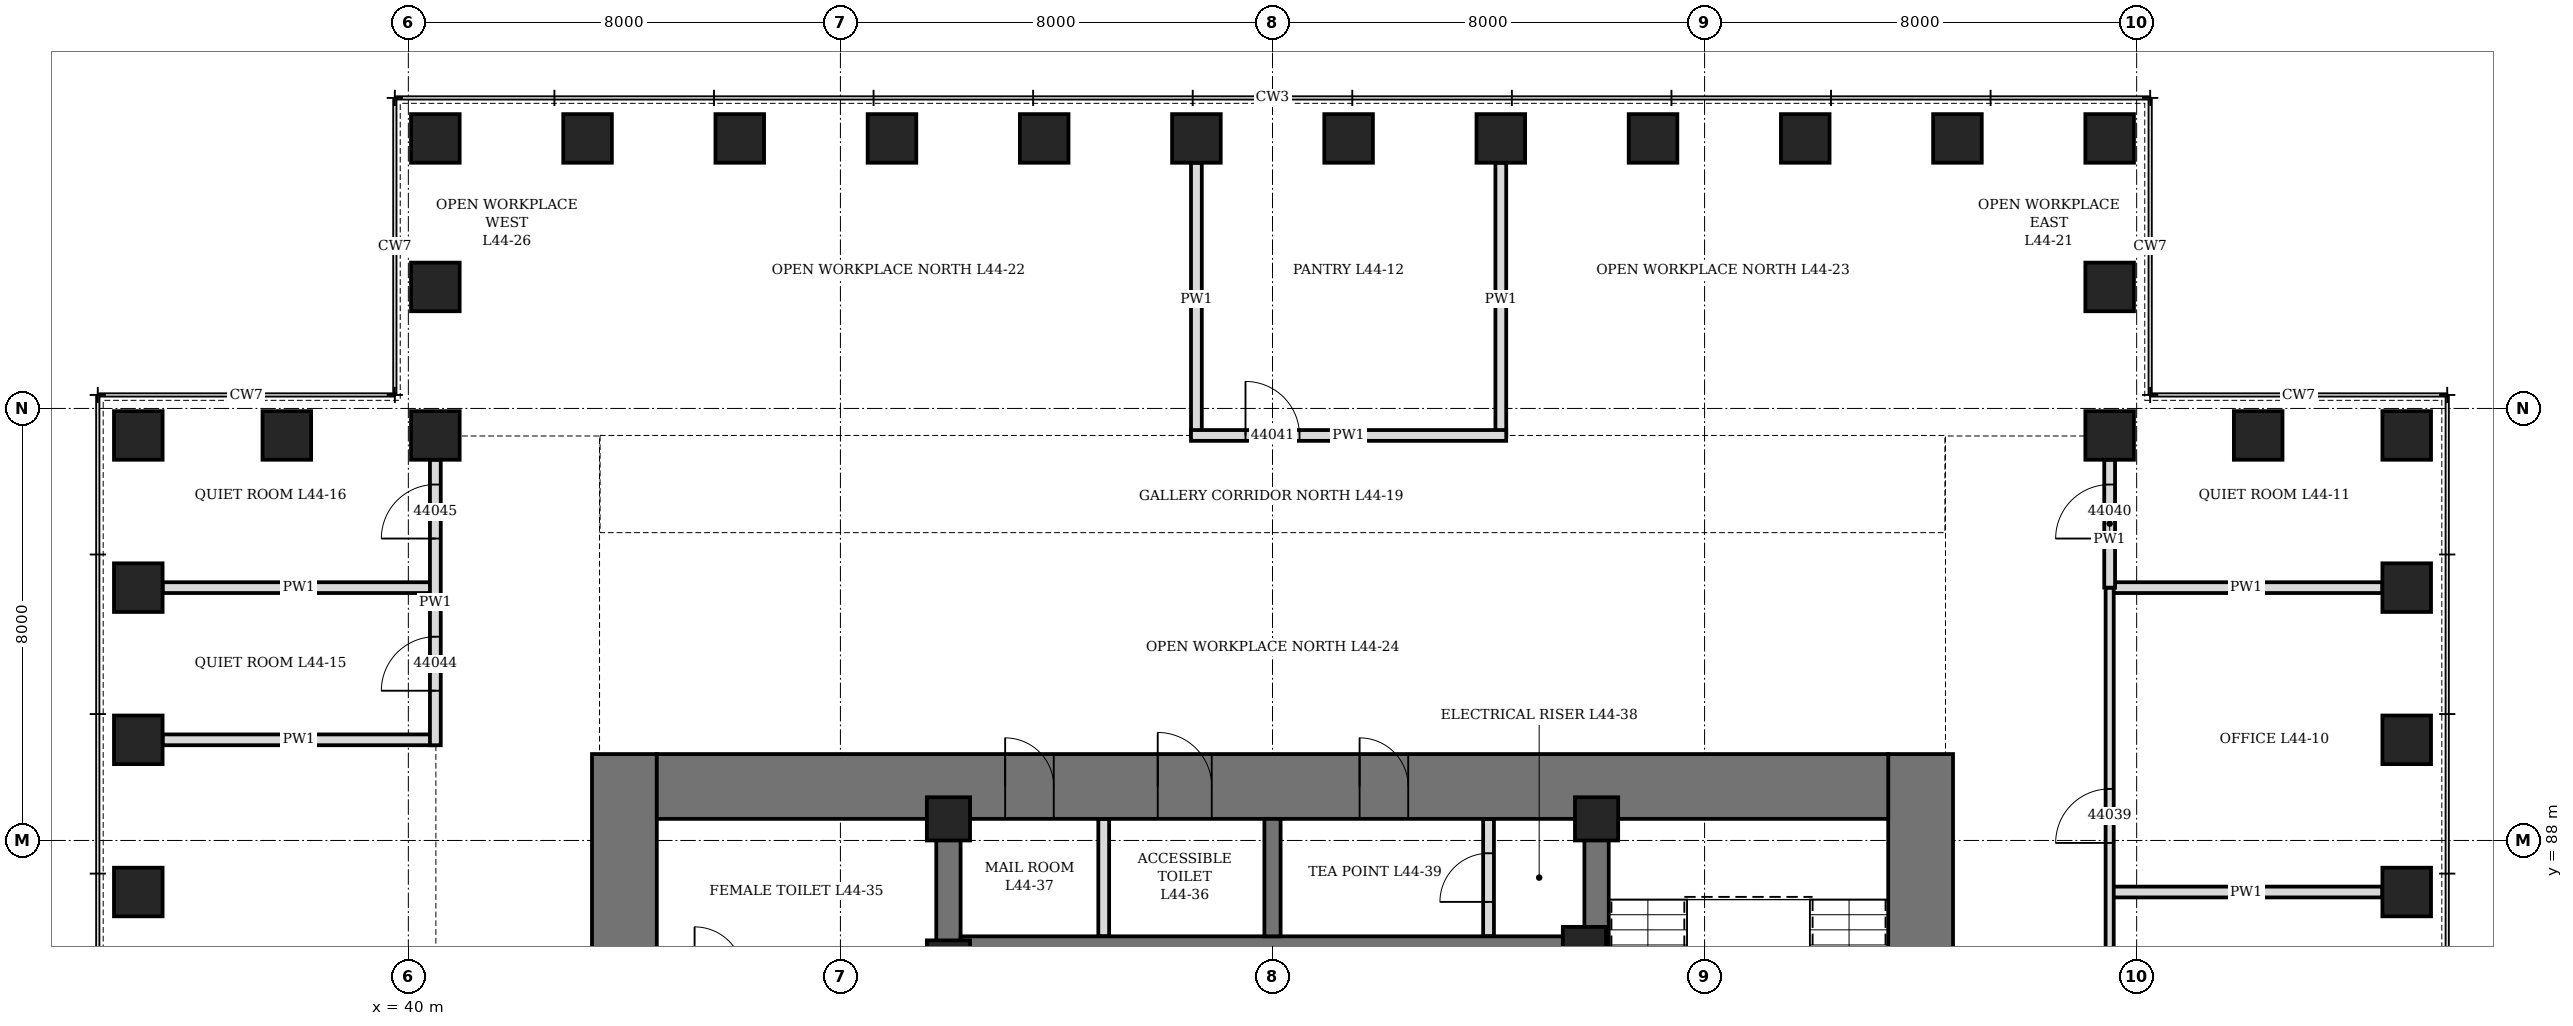
"""IFC4 building model, lengths in metres.
Left out: names, types, materials, properties, quantities, classifications, styles, units other than length and angle.
Written with IfcOpenShell. Run it as: python <this file> out.ifc"""

import sys

from ifc_helpers import new_model, si_unit, direction, frame, frame_2d, origin, origin_2d, place, context, subcontext, project, spatial, rectangle, hollow_rectangle, extrude, element, fill, save


model = new_model("IFC4")
c1 = context("Model", 3, precision=1e-05, world=origin(), true_north=direction((0.0, 1.0)))
c2 = subcontext(c1, "Body", "Model", "MODEL_VIEW")
j1 = project(units=[si_unit("LENGTHUNIT", "METRE"), si_unit("PLANEANGLEUNIT", "RADIAN")], contexts=[c1])
p1 = place(None, origin())
s1 = spatial("IfcSite", under=j1, at=p1, CompositionType="ELEMENT")
p2 = place(p1, origin())
s2 = spatial("IfcBuilding", under=s1, at=p2, CompositionType="ELEMENT")
p3 = place(p2, frame((0.0, 0.0, 198.1)))
s3 = spatial("IfcBuildingStorey", under=s2, at=p3, CompositionType="ELEMENT", Elevation=198.1)
for number, where, z_axis, x_axis in (
    (1, (77.0, 87.045, 0.0), (0.0, 0.0, 1.0), (0.0, 1.0, 0.0)),
    (2, (77.0, 89.864, 0.0), (0.0, 0.0, 1.0), (0.0, 1.0, 0.0)),
    (3, (77.0, 92.682, 0.0), (0.0, 0.0, 1.0), (0.0, 1.0, 0.0)),
    (4, (77.0, 95.5, 0.0), (0.0, 0.0, 1.0), (1.0, 0.0, 0.0)),
    (5, (74.25, 95.5, 0.0), (0.0, 0.0, 1.0), (1.0, 0.0, 0.0)),
    (6, (71.5, 95.5, 0.0), (0.0, 0.0, 1.0), (0.0, 1.0, 0.0)),
    (7, (71.5, 98.25, 0.0), (0.0, 0.0, 1.0), (0.0, 1.0, 0.0)),
    (8, (71.5, 101.0, 0.0), (0.0, 0.0, 1.0), (1.0, 0.0, 0.0)),
    (9, (68.682, 101.0, 0.0), (0.0, 0.0, 1.0), (1.0, 0.0, 0.0)),
    (10, (65.864, 101.0, 0.0), (0.0, 0.0, 1.0), (1.0, 0.0, 0.0)),
    (11, (63.045, 101.0, 0.0), (0.0, 0.0, 1.0), (1.0, 0.0, 0.0)),
    (12, (60.227, 101.0, 0.0), (0.0, 0.0, 1.0), (1.0, 0.0, 0.0)),
    (13, (57.409, 101.0, 0.0), (0.0, 0.0, 1.0), (1.0, 0.0, 0.0)),
    (14, (54.591, 101.0, 0.0), (0.0, 0.0, 1.0), (1.0, 0.0, 0.0)),
    (15, (51.773, 101.0, 0.0), (0.0, 0.0, 1.0), (1.0, 0.0, 0.0)),
    (16, (48.955, 101.0, 0.0), (0.0, 0.0, 1.0), (1.0, 0.0, 0.0)),
    (17, (46.136, 101.0, 0.0), (0.0, 0.0, 1.0), (1.0, 0.0, 0.0)),
    (18, (43.318, 101.0, 0.0), (0.0, 0.0, 1.0), (1.0, 0.0, 0.0)),
    (19, (40.5, 101.0, 0.0), (0.0, 0.0, 1.0), (0.0, 1.0, 0.0)),
    (20, (40.5, 98.25, 0.0), (0.0, 0.0, 1.0), (0.0, 1.0, 0.0)),
    (21, (40.5, 95.5, 0.0), (0.0, 0.0, 1.0), (1.0, 0.0, 0.0)),
    (22, (37.75, 95.5, 0.0), (0.0, 0.0, 1.0), (1.0, 0.0, 0.0)),
    (23, (35.0, 95.5, 0.0), (0.0, 0.0, 1.0), (0.0, 1.0, 0.0)),
    (24, (35.0, 92.682, 0.0), (0.0, 0.0, 1.0), (0.0, 1.0, 0.0)),
    (25, (35.0, 89.864, 0.0), (0.0, 0.0, 1.0), (0.0, 1.0, 0.0)),
    (26, (35.0, 87.045, 0.0), (0.0, 0.0, 1.0), (0.0, 1.0, 0.0)),
):
    element("IfcColumn", number, at=place(p3, frame(where, z_axis=z_axis, x_axis=x_axis)), inside=s3, PredefinedType="COLUMN", context=c2, shape_type="SweptSolid", body=[
        extrude(hollow_rectangle(XDim=0.9, YDim=0.9, WallThickness=0.12, at=origin_2d()), origin(), (0.0, 0.0, 1.0), 4.2),
    ])
p4 = place(p3, frame((44.0, 70.4, 0.0), z_axis=(0.0, 0.0, 1.0), x_axis=(0.0, 1.0, 0.0)))
e27 = element("IfcWall", 27, at=p4, inside=s3, PredefinedType="SHEAR", context=c2, shape_type="SweptSolid", body=[
    extrude(rectangle(XDim=19.2, YDim=1.2, at=frame_2d((9.6, 0.0))), origin(), (0.0, 0.0, 1.0), 4.2),
])
p5 = place(p4, frame((8.6, 0.0, 0.0)))
e28 = element("IfcOpeningElement", 28, at=p5, cuts=e27, PredefinedType="OPENING", context=c2, shape_type="SweptSolid", body=[
    extrude(rectangle(XDim=2.0, YDim=2.4, at=frame_2d((1.0, 1.2))), frame((0.0, 0.61, 0.0), z_axis=(0.0, -1.0, 0.0), x_axis=(1.0, 0.0, 0.0)), (0.0, 0.0, 1.0), 1.22),
])
p6 = place(p3, frame((68.0, 70.4, 0.0), z_axis=(0.0, 0.0, 1.0), x_axis=(0.0, 1.0, 0.0)))
e29 = element("IfcWall", 29, at=p6, inside=s3, PredefinedType="SHEAR", context=c2, shape_type="SweptSolid", body=[
    extrude(rectangle(XDim=19.2, YDim=1.2, at=frame_2d((9.6, 0.0))), origin(), (0.0, 0.0, 1.0), 4.2),
])
p7 = place(p6, frame((8.6, 0.0, 0.0)))
e30 = element("IfcOpeningElement", 30, at=p7, cuts=e29, PredefinedType="OPENING", context=c2, shape_type="SweptSolid", body=[
    extrude(rectangle(XDim=2.0, YDim=2.4, at=frame_2d((1.0, 1.2))), frame((0.0, 0.61, 0.0), z_axis=(0.0, -1.0, 0.0), x_axis=(1.0, 0.0, 0.0)), (0.0, 0.0, 1.0), 1.22),
])
p8 = place(p3, frame((44.6, 89.0, 0.0), z_axis=(0.0, 0.0, 1.0), x_axis=(1.0, 0.0, 0.0)))
e31 = element("IfcWall", 31, at=p8, inside=s3, PredefinedType="SHEAR", context=c2, shape_type="SweptSolid", body=[
    extrude(rectangle(XDim=22.8, YDim=1.2, at=frame_2d((11.4, 0.0))), origin(), (0.0, 0.0, 1.0), 4.2),
])
p9 = place(p8, frame((9.275, 0.0, 0.0)))
e32 = element("IfcOpeningElement", 32, at=p9, cuts=e31, PredefinedType="OPENING", context=c2, shape_type="SweptSolid", body=[
    extrude(rectangle(XDim=1.0, YDim=2.1, at=frame_2d((0.5, 1.05))), frame((0.0, 0.61, 0.0), z_axis=(0.0, -1.0, 0.0), x_axis=(1.0, 0.0, 0.0)), (0.0, 0.0, 1.0), 1.22),
])
p10 = place(p8, frame((6.45, 0.0, 0.0)))
e33 = element("IfcOpeningElement", 33, at=p10, cuts=e31, PredefinedType="OPENING", context=c2, shape_type="SweptSolid", body=[
    extrude(rectangle(XDim=0.9, YDim=2.1, at=frame_2d((0.45, 1.05))), frame((0.0, 0.61, 0.0), z_axis=(0.0, -1.0, 0.0), x_axis=(1.0, 0.0, 0.0)), (0.0, 0.0, 1.0), 1.22),
])
p11 = place(p8, frame((13.012, 0.0, 0.0)))
e34 = element("IfcOpeningElement", 34, at=p11, cuts=e31, PredefinedType="OPENING", context=c2, shape_type="SweptSolid", body=[
    extrude(rectangle(XDim=0.9, YDim=2.1, at=frame_2d((0.45, 1.05))), frame((0.0, 0.61, 0.0), z_axis=(0.0, -1.0, 0.0), x_axis=(1.0, 0.0, 0.0)), (0.0, 0.0, 1.0), 1.22),
])
p12 = place(p3, frame((50.0, 71.6, 0.0), z_axis=(0.0, 0.0, 1.0), x_axis=(0.0, 1.0, 0.0)))
e35 = element("IfcWall", 35, at=p12, inside=s3, PredefinedType="SHEAR", context=c2, shape_type="SweptSolid", body=[
    extrude(rectangle(XDim=16.8, YDim=0.45, at=frame_2d((8.4, 0.0))), origin(), (0.0, 0.0, 1.0), 4.2),
])
p13 = place(p12, frame((7.5, 0.0, 0.0)))
e36 = element("IfcOpeningElement", 36, at=p13, cuts=e35, PredefinedType="OPENING", context=c2, shape_type="SweptSolid", body=[
    extrude(rectangle(XDim=1.8, YDim=2.4, at=frame_2d((0.9, 1.2))), frame((0.0, 0.235, 0.0), z_axis=(0.0, -1.0, 0.0), x_axis=(1.0, 0.0, 0.0)), (0.0, 0.0, 1.0), 0.47),
])
p14 = place(p3, frame((62.0, 71.6, 0.0), z_axis=(0.0, 0.0, 1.0), x_axis=(0.0, 1.0, 0.0)))
e37 = element("IfcWall", 37, at=p14, inside=s3, PredefinedType="SHEAR", context=c2, shape_type="SweptSolid", body=[
    extrude(rectangle(XDim=16.8, YDim=0.45, at=frame_2d((8.4, 0.0))), origin(), (0.0, 0.0, 1.0), 4.2),
])
p15 = place(p14, frame((7.5, 0.0, 0.0)))
e38 = element("IfcOpeningElement", 38, at=p15, cuts=e37, PredefinedType="OPENING", context=c2, shape_type="SweptSolid", body=[
    extrude(rectangle(XDim=1.8, YDim=2.4, at=frame_2d((0.9, 1.2))), frame((0.0, 0.235, 0.0), z_axis=(0.0, -1.0, 0.0), x_axis=(1.0, 0.0, 0.0)), (0.0, 0.0, 1.0), 0.47),
])
p16 = place(p3, frame((50.225, 86.0, 0.0), z_axis=(0.0, 0.0, 1.0), x_axis=(1.0, 0.0, 0.0)))
e39 = element("IfcWall", 39, at=p16, inside=s3, PredefinedType="SHEAR", context=c2, shape_type="SweptSolid", body=[
    extrude(rectangle(XDim=11.55, YDim=0.45, at=frame_2d((5.775, 0.0))), origin(), (0.0, 0.0, 1.0), 4.2),
])
p17 = place(p3, frame((56.0, 86.225, 0.0), z_axis=(0.0, 0.0, 1.0), x_axis=(0.0, 1.0, 0.0)))
e40 = element("IfcWall", 40, at=p17, inside=s3, PredefinedType="SHEAR", context=c2, shape_type="SweptSolid", body=[
    extrude(rectangle(XDim=2.175, YDim=0.3, at=frame_2d((1.087, 0.0))), origin(), (0.0, 0.0, 1.0), 4.2),
])
for number, where, z_axis, x_axis in (
    (41, (50.0, 85.75, 0.0), (0.0, 0.0, 1.0), (1.0, 0.0, 0.0)),
    (42, (50.0, 88.4, 0.0), (0.0, 0.0, 1.0), (1.0, 0.0, 0.0)),
    (43, (61.775, 86.0, 0.0), (0.0, 0.0, 1.0), (1.0, 0.0, 0.0)),
    (44, (62.0, 88.4, 0.0), (0.0, 0.0, 1.0), (1.0, 0.0, 0.0)),
):
    element("IfcColumn", number, at=place(p3, frame(where, z_axis=z_axis, x_axis=x_axis)), inside=s3, PredefinedType="COLUMN", context=c2, shape_type="SweptSolid", body=[
        extrude(hollow_rectangle(XDim=0.8, YDim=0.8, WallThickness=0.1, at=origin_2d()), origin(), (0.0, 0.0, 1.0), 4.2),
    ])
p18 = place(p3, frame((52.875, 86.225, 0.0), z_axis=(0.0, 0.0, 1.0), x_axis=(0.0, 1.0, 0.0)))
e45 = element("IfcWall", 45, at=p18, inside=s3, PredefinedType="PARTITIONING", context=c2, shape_type="SweptSolid", body=[
    extrude(rectangle(XDim=2.175, YDim=0.2, at=frame_2d((1.087, 0.0))), origin(), (0.0, 0.0, 1.0), 4.04),
])
p19 = place(p3, frame((60.0, 86.225, 0.0), z_axis=(0.0, 0.0, 1.0), x_axis=(0.0, 1.0, 0.0)))
e46 = element("IfcWall", 46, at=p19, inside=s3, PredefinedType="PARTITIONING", context=c2, shape_type="SweptSolid", body=[
    extrude(rectangle(XDim=2.175, YDim=0.2, at=frame_2d((1.087, 0.0))), origin(), (0.0, 0.0, 1.0), 4.04),
])
p20 = place(p19, frame((0.637, 0.0, 0.0)))
e47 = element("IfcOpeningElement", 47, at=p20, cuts=e46, PredefinedType="OPENING", context=c2, shape_type="SweptSolid", body=[
    extrude(rectangle(XDim=0.9, YDim=2.1, at=frame_2d((0.45, 1.05))), frame((0.0, 0.11, 0.0), z_axis=(0.0, -1.0, 0.0), x_axis=(1.0, 0.0, 0.0)), (0.0, 0.0, 1.0), 0.22),
])
for number, where, z_axis, x_axis in (
    (48, (71.5, 87.045, 0.0), (0.0, 0.0, 1.0), (1.0, 0.0, 0.0)),
    (49, (71.5, 92.682, 0.0), (0.0, 0.0, 1.0), (1.0, 0.0, 0.0)),
    (50, (54.591, 95.5, 0.0), (0.0, 0.0, 1.0), (0.0, 1.0, 0.0)),
    (51, (60.227, 95.5, 0.0), (0.0, 0.0, 1.0), (0.0, 1.0, 0.0)),
    (52, (35.45, 89.864, 0.0), (0.0, 0.0, 1.0), (1.0, 0.0, 0.0)),
    (53, (35.45, 92.682, 0.0), (0.0, 0.0, 1.0), (1.0, 0.0, 0.0)),
):
    element("IfcWall", number, at=place(p3, frame(where, z_axis=z_axis, x_axis=x_axis)), inside=s3, PredefinedType="PARTITIONING", context=c2, shape_type="SweptSolid", body=[
        extrude(rectangle(XDim=5.05, YDim=0.2, at=frame_2d((2.525, 0.0))), origin(), (0.0, 0.0, 1.0), 3.428),
    ])
p21 = place(p3, frame((54.491, 95.5, 0.0), z_axis=(0.0, 0.0, 1.0), x_axis=(1.0, 0.0, 0.0)))
e54 = element("IfcWall", 54, at=p21, inside=s3, PredefinedType="PARTITIONING", context=c2, shape_type="SweptSolid", body=[
    extrude(rectangle(XDim=5.836, YDim=0.2, at=frame_2d((2.918, 0.0))), origin(), (0.0, 0.0, 1.0), 4.04),
])
p22 = place(p21, frame((1.009, 0.0, 0.0)))
e55 = element("IfcOpeningElement", 55, at=p22, cuts=e54, PredefinedType="OPENING", context=c2, shape_type="SweptSolid", body=[
    extrude(rectangle(XDim=1.0, YDim=2.1, at=frame_2d((0.5, 1.05))), frame((0.0, 0.11, 0.0), z_axis=(0.0, -1.0, 0.0), x_axis=(1.0, 0.0, 0.0)), (0.0, 0.0, 1.0), 0.22),
])
p23 = place(p3, frame((40.5, 89.764, 0.0), z_axis=(0.0, 0.0, 1.0), x_axis=(0.0, 1.0, 0.0)))
e56 = element("IfcWall", 56, at=p23, inside=s3, PredefinedType="PARTITIONING", context=c2, shape_type="SweptSolid", body=[
    extrude(rectangle(XDim=5.286, YDim=0.2, at=frame_2d((2.643, 0.0))), origin(), (0.0, 0.0, 1.0), 4.04),
])
p24 = place(p23, frame((1.009, 0.0, 0.0)))
e57 = element("IfcOpeningElement", 57, at=p24, cuts=e56, PredefinedType="OPENING", context=c2, shape_type="SweptSolid", body=[
    extrude(rectangle(XDim=1.0, YDim=2.1, at=frame_2d((0.5, 1.05))), frame((0.0, 0.11, 0.0), z_axis=(0.0, -1.0, 0.0), x_axis=(1.0, 0.0, 0.0)), (0.0, 0.0, 1.0), 0.22),
])
p25 = place(p23, frame((3.827, 0.0, 0.0)))
e58 = element("IfcOpeningElement", 58, at=p25, cuts=e56, PredefinedType="OPENING", context=c2, shape_type="SweptSolid", body=[
    extrude(rectangle(XDim=1.0, YDim=2.1, at=frame_2d((0.5, 1.05))), frame((0.0, 0.11, 0.0), z_axis=(0.0, -1.0, 0.0), x_axis=(1.0, 0.0, 0.0)), (0.0, 0.0, 1.0), 0.22),
])
p26 = place(p3, frame((71.5, 70.136, 0.0), z_axis=(0.0, 0.0, 1.0), x_axis=(0.0, 1.0, 0.0)))
e59 = element("IfcWall", 59, at=p26, inside=s3, PredefinedType="PARTITIONING", context=c2, shape_type="SweptSolid", body=[
    extrude(rectangle(XDim=22.545, YDim=0.15, at=frame_2d((11.273, 0.0))), origin(), (0.0, 0.0, 1.0), 4.04),
])
p27 = place(p26, frame((0.909, 0.0, 0.0)))
e60 = element("IfcOpeningElement", 60, at=p27, cuts=e59, PredefinedType="OPENING", context=c2, shape_type="SweptSolid", body=[
    extrude(rectangle(XDim=1.0, YDim=2.1, at=frame_2d((0.5, 1.05))), frame((0.0, 0.085, 0.0), z_axis=(0.0, -1.0, 0.0), x_axis=(1.0, 0.0, 0.0)), (0.0, 0.0, 1.0), 0.17),
])
p28 = place(p26, frame((6.545, 0.0, 0.0)))
e61 = element("IfcOpeningElement", 61, at=p28, cuts=e59, PredefinedType="OPENING", context=c2, shape_type="SweptSolid", body=[
    extrude(rectangle(XDim=1.0, YDim=2.1, at=frame_2d((0.5, 1.05))), frame((0.0, 0.085, 0.0), z_axis=(0.0, -1.0, 0.0), x_axis=(1.0, 0.0, 0.0)), (0.0, 0.0, 1.0), 0.17),
])
p29 = place(p26, frame((12.182, 0.0, 0.0)))
e62 = element("IfcOpeningElement", 62, at=p29, cuts=e59, PredefinedType="OPENING", context=c2, shape_type="SweptSolid", body=[
    extrude(rectangle(XDim=1.0, YDim=2.1, at=frame_2d((0.5, 1.05))), frame((0.0, 0.085, 0.0), z_axis=(0.0, -1.0, 0.0), x_axis=(1.0, 0.0, 0.0)), (0.0, 0.0, 1.0), 0.17),
])
p30 = place(p26, frame((17.818, 0.0, 0.0)))
e63 = element("IfcOpeningElement", 63, at=p30, cuts=e59, PredefinedType="OPENING", context=c2, shape_type="SweptSolid", body=[
    extrude(rectangle(XDim=1.0, YDim=2.1, at=frame_2d((0.5, 1.05))), frame((0.0, 0.085, 0.0), z_axis=(0.0, -1.0, 0.0), x_axis=(1.0, 0.0, 0.0)), (0.0, 0.0, 1.0), 0.17),
])
p31 = place(p3, frame((71.5, 92.682, 0.0), z_axis=(0.0, 0.0, 1.0), x_axis=(0.0, 1.0, 0.0)))
e64 = element("IfcWall", 64, at=p31, inside=s3, PredefinedType="PARTITIONING", context=c2, shape_type="SweptSolid", body=[
    extrude(rectangle(XDim=2.368, YDim=0.2, at=frame_2d((1.184, 0.0))), origin(), (0.0, 0.0, 1.0), 4.04),
])
p32 = place(p31, frame((0.909, 0.0, 0.0)))
e65 = element("IfcOpeningElement", 65, at=p32, cuts=e64, PredefinedType="OPENING", context=c2, shape_type="SweptSolid", body=[
    extrude(rectangle(XDim=1.0, YDim=2.1, at=frame_2d((0.5, 1.05))), frame((0.0, 0.11, 0.0), z_axis=(0.0, -1.0, 0.0), x_axis=(1.0, 0.0, 0.0)), (0.0, 0.0, 1.0), 0.22),
])
p33 = place(p9, origin())
e66 = element("IfcDoor", 66, at=p33, inside=s3, OperationType="SINGLE_SWING_LEFT", PredefinedType="DOOR", context=c2, shape_type="SweptSolid", body=[
    extrude(rectangle(XDim=1.0, YDim=2.1, at=frame_2d((0.5, 1.05))), frame((0.0, 0.35, 0.0), z_axis=(0.0, -1.0, 0.0), x_axis=(1.0, 0.0, 0.0)), (0.0, 0.0, 1.0), 0.7),
])
fill(e32, e66)
p34 = place(p10, origin())
e67 = element("IfcDoor", 67, at=p34, inside=s3, OperationType="SINGLE_SWING_LEFT", PredefinedType="DOOR", context=c2, shape_type="SweptSolid", body=[
    extrude(rectangle(XDim=0.9, YDim=2.1, at=frame_2d((0.45, 1.05))), frame((0.0, 0.35, 0.0), z_axis=(0.0, -1.0, 0.0), x_axis=(1.0, 0.0, 0.0)), (0.0, 0.0, 1.0), 0.7),
])
fill(e33, e67)
p35 = place(p11, origin())
e68 = element("IfcDoor", 68, at=p35, inside=s3, OperationType="SINGLE_SWING_LEFT", PredefinedType="DOOR", context=c2, shape_type="SweptSolid", body=[
    extrude(rectangle(XDim=0.9, YDim=2.1, at=frame_2d((0.45, 1.05))), frame((0.0, 0.35, 0.0), z_axis=(0.0, -1.0, 0.0), x_axis=(1.0, 0.0, 0.0)), (0.0, 0.0, 1.0), 0.7),
])
fill(e34, e68)
p36 = place(p20, origin())
e69 = element("IfcDoor", 69, at=p36, inside=s3, OperationType="SINGLE_SWING_LEFT", PredefinedType="DOOR", context=c2, shape_type="SweptSolid", body=[
    extrude(rectangle(XDim=0.9, YDim=2.1, at=frame_2d((0.45, 1.05))), frame((0.0, 0.1, 0.0), z_axis=(0.0, -1.0, 0.0), x_axis=(1.0, 0.0, 0.0)), (0.0, 0.0, 1.0), 0.199),
])
fill(e47, e69)
p37 = place(p30, origin())
e70 = element("IfcDoor", 70, at=p37, inside=s3, OperationType="SINGLE_SWING_LEFT", PredefinedType="DOOR", context=c2, shape_type="SweptSolid", body=[
    extrude(rectangle(XDim=1.0, YDim=2.1, at=frame_2d((0.5, 1.05))), frame((0.0, 0.075, 0.0), z_axis=(0.0, -1.0, 0.0), x_axis=(1.0, 0.0, 0.0)), (0.0, 0.0, 1.0), 0.149),
])
fill(e63, e70)
p38 = place(p32, origin())
e71 = element("IfcDoor", 71, at=p38, inside=s3, OperationType="SINGLE_SWING_LEFT", PredefinedType="DOOR", context=c2, shape_type="SweptSolid", body=[
    extrude(rectangle(XDim=1.0, YDim=2.1, at=frame_2d((0.5, 1.05))), frame((0.0, 0.1, 0.0), z_axis=(0.0, -1.0, 0.0), x_axis=(1.0, 0.0, 0.0)), (0.0, 0.0, 1.0), 0.199),
])
fill(e65, e71)
p39 = place(p22, origin())
e72 = element("IfcDoor", 72, at=p39, inside=s3, OperationType="SINGLE_SWING_LEFT", PredefinedType="DOOR", context=c2, shape_type="SweptSolid", body=[
    extrude(rectangle(XDim=1.0, YDim=2.1, at=frame_2d((0.5, 1.05))), frame((0.0, 0.1, 0.0), z_axis=(0.0, -1.0, 0.0), x_axis=(1.0, 0.0, 0.0)), (0.0, 0.0, 1.0), 0.199),
])
fill(e55, e72)
p40 = place(p24, origin())
e73 = element("IfcDoor", 73, at=p40, inside=s3, OperationType="SINGLE_SWING_LEFT", PredefinedType="DOOR", context=c2, shape_type="SweptSolid", body=[
    extrude(rectangle(XDim=1.0, YDim=2.1, at=frame_2d((0.5, 1.05))), frame((0.0, 0.1, 0.0), z_axis=(0.0, -1.0, 0.0), x_axis=(1.0, 0.0, 0.0)), (0.0, 0.0, 1.0), 0.199),
])
fill(e57, e73)
p41 = place(p25, origin())
e74 = element("IfcDoor", 74, at=p41, inside=s3, OperationType="SINGLE_SWING_LEFT", PredefinedType="DOOR", context=c2, shape_type="SweptSolid", body=[
    extrude(rectangle(XDim=1.0, YDim=2.1, at=frame_2d((0.5, 1.05))), frame((0.0, 0.1, 0.0), z_axis=(0.0, -1.0, 0.0), x_axis=(1.0, 0.0, 0.0)), (0.0, 0.0, 1.0), 0.199),
])
fill(e58, e74)
save(model, sys.argv[1])
